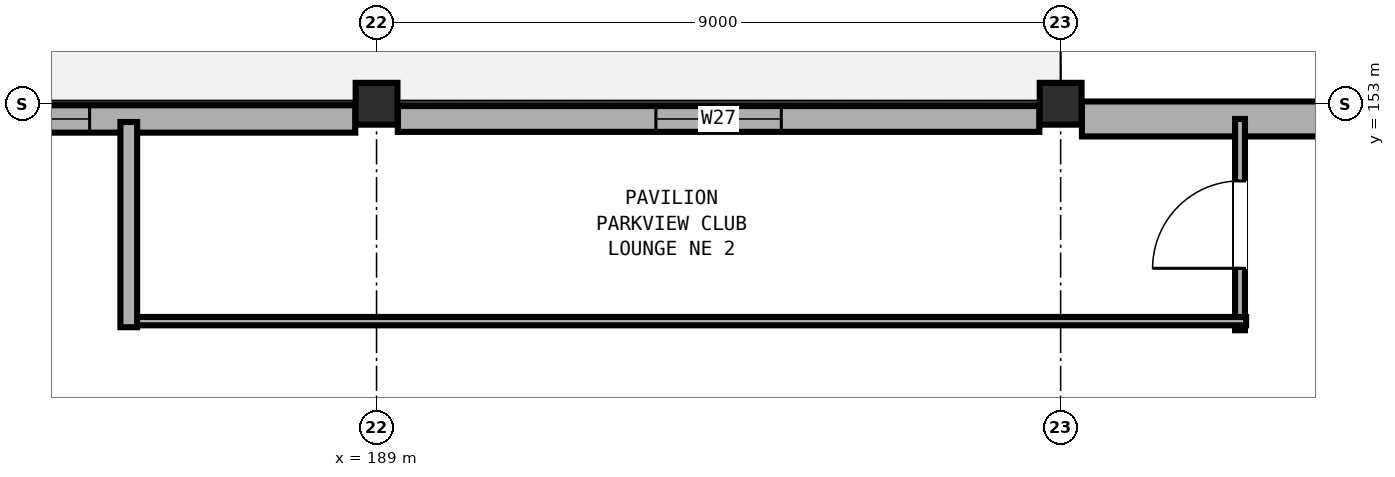
"""IFC4 building model, lengths in metres.
Left out: names, types, materials, properties, quantities, classifications, styles, units other than length and angle.
Written with IfcOpenShell. Run it as: python <this file> out.ifc"""

import sys

from ifc_helpers import new_model, si_unit, direction, frame, frame_2d, origin, origin_2d, place, context, subcontext, project, spatial, rectangle, extrude, element, fill, save


model = new_model("IFC4")
c1 = context("Model", 3, precision=1e-05, world=origin(), true_north=direction((0.0, 1.0)))
c2 = subcontext(c1, "Body", "Model", "MODEL_VIEW")
j1 = project(units=[si_unit("LENGTHUNIT", "METRE"), si_unit("PLANEANGLEUNIT", "RADIAN")], contexts=[c1])
p1 = place(None, origin())
s1 = spatial("IfcSite", under=j1, at=p1, CompositionType="ELEMENT")
p2 = place(p1, origin())
s2 = spatial("IfcBuilding", under=s1, at=p2, CompositionType="ELEMENT")
p3 = place(p2, frame((0.0, 0.0, 9.6)))
s3 = spatial("IfcBuildingStorey", under=s2, at=p3, CompositionType="ELEMENT", Elevation=9.6)
for number, where, z_axis, x_axis in (
    (1, (189.0, 153.0, 0.0), (0.0, 0.0, 1.0), (1.0, 0.0, 0.0)),
    (2, (198.0, 153.0, 0.0), (0.0, 0.0, 1.0), (1.0, 0.0, 0.0)),
):
    element("IfcColumn", number, at=place(p3, frame(where, z_axis=z_axis, x_axis=x_axis)), inside=s3, PredefinedType="COLUMN", context=c2, shape_type="SweptSolid", body=[
        extrude(rectangle(XDim=0.55, YDim=0.55, at=origin_2d()), origin(), (0.0, 0.0, 1.0), 4.8),
    ])
p4 = place(p3, frame((180.28, 152.8, 0.0), z_axis=(0.0, 0.0, 1.0), x_axis=(1.0, 0.0, 0.0)))
e3 = element("IfcWall", 3, at=p4, inside=s3, PredefinedType="SOLIDWALL", context=c2, shape_type="SweptSolid", body=[
    extrude(rectangle(XDim=8.44, YDim=0.36, at=frame_2d((4.22, 0.0))), origin(), (0.0, 0.0, 1.0), 3.58),
])
p5 = place(p4, frame((3.495, 0.0, 0.9)))
e4 = element("IfcOpeningElement", 4, at=p5, cuts=e3, PredefinedType="OPENING", context=c2, shape_type="SweptSolid", body=[
    extrude(rectangle(XDim=1.45, YDim=1.85, at=frame_2d((0.725, 0.925))), frame((0.0, 0.19, 0.0), z_axis=(0.0, -1.0, 0.0), x_axis=(1.0, 0.0, 0.0)), (0.0, 0.0, 1.0), 0.38),
])
p6 = place(p3, frame((189.28, 152.8, 0.0), z_axis=(0.0, 0.0, 1.0), x_axis=(1.0, 0.0, 0.0)))
e5 = element("IfcWall", 5, at=p6, inside=s3, PredefinedType="SOLIDWALL", context=c2, shape_type="SweptSolid", body=[
    extrude(rectangle(XDim=8.44, YDim=0.34, at=frame_2d((4.22, 0.0))), origin(), (0.0, 0.0, 1.0), 3.58),
])
p7 = place(p6, frame((3.395, 0.0, 0.9)))
e6 = element("IfcOpeningElement", 6, at=p7, cuts=e5, PredefinedType="OPENING", context=c2, shape_type="SweptSolid", body=[
    extrude(rectangle(XDim=1.65, YDim=1.9, at=frame_2d((0.825, 0.95))), frame((0.0, 0.18, 0.0), z_axis=(0.0, -1.0, 0.0), x_axis=(1.0, 0.0, 0.0)), (0.0, 0.0, 1.0), 0.36),
])
p8 = place(p3, frame((198.28, 152.8, 0.0), z_axis=(0.0, 0.0, 1.0), x_axis=(1.0, 0.0, 0.0)))
e7 = element("IfcWall", 7, at=p8, inside=s3, PredefinedType="SOLIDWALL", context=c2, shape_type="SweptSolid", body=[
    extrude(rectangle(XDim=8.44, YDim=0.46, at=frame_2d((4.22, 0.0))), origin(), (0.0, 0.0, 1.0), 3.58),
])
p9 = place(p8, frame((3.295, 0.0, 0.9)))
e8 = element("IfcOpeningElement", 8, at=p9, cuts=e7, PredefinedType="OPENING", context=c2, shape_type="SweptSolid", body=[
    extrude(rectangle(XDim=1.85, YDim=1.95, at=frame_2d((0.925, 0.975))), frame((0.0, 0.24, 0.0), z_axis=(0.0, -1.0, 0.0), x_axis=(1.0, 0.0, 0.0)), (0.0, 0.0, 1.0), 0.48),
])
p10 = place(p3, frame((200.36, 150.02, 0.0), z_axis=(0.0, 0.0, 1.0), x_axis=(0.0, 1.0, 0.0)))
e9 = element("IfcWall", 9, at=p10, inside=s3, PredefinedType="PARTITIONING", context=c2, shape_type="SweptSolid", body=[
    extrude(rectangle(XDim=2.78, YDim=0.13, at=frame_2d((1.39, 0.0))), origin(), (0.0, 0.0, 1.0), 3.56),
])
p11 = place(p10, frame((0.815, 0.0, 0.0)))
e10 = element("IfcOpeningElement", 10, at=p11, cuts=e9, PredefinedType="OPENING", context=c2, shape_type="SweptSolid", body=[
    extrude(rectangle(XDim=1.15, YDim=2.15, at=frame_2d((0.575, 1.075))), frame((0.0, 0.075, 0.0), z_axis=(0.0, -1.0, 0.0), x_axis=(1.0, 0.0, 0.0)), (0.0, 0.0, 1.0), 0.15),
])
p12 = place(p3, frame((200.44, 150.14, 0.0), z_axis=(0.0, 0.0, 1.0), x_axis=(-1.0, 0.0, 0.0)))
e11 = element("IfcWall", 11, at=p12, inside=s3, PredefinedType="PARTITIONING", context=c2, shape_type="SweptSolid", body=[
    extrude(rectangle(XDim=14.78, YDim=0.11, at=frame_2d((7.39, 0.0))), origin(), (0.0, 0.0, 1.0), 3.56),
])
p13 = place(p3, frame((185.74, 150.06, 0.0), z_axis=(0.0, 0.0, 1.0), x_axis=(0.0, 1.0, 0.0)))
e12 = element("IfcWall", 12, at=p13, inside=s3, PredefinedType="PARTITIONING", context=c2, shape_type="SweptSolid", body=[
    extrude(rectangle(XDim=2.7, YDim=0.22, at=frame_2d((1.35, 0.0))), origin(), (0.0, 0.0, 1.0), 3.56),
])
p14 = place(p5, origin())
e13 = element("IfcWindow", 13, at=p14, inside=s3, PartitioningType="SINGLE_PANEL", PredefinedType="WINDOW", context=c2, shape_type="SweptSolid", body=[
    extrude(rectangle(XDim=1.45, YDim=1.85, at=frame_2d((0.725, 0.925))), frame((0.0, 0.03, 0.0), z_axis=(0.0, -1.0, 0.0), x_axis=(1.0, 0.0, 0.0)), (0.0, 0.0, 1.0), 0.06),
])
fill(e4, e13)
p15 = place(p7, origin())
e14 = element("IfcWindow", 14, at=p15, inside=s3, PartitioningType="SINGLE_PANEL", PredefinedType="WINDOW", context=c2, shape_type="SweptSolid", body=[
    extrude(rectangle(XDim=1.65, YDim=1.9, at=frame_2d((0.825, 0.95))), frame((0.0, 0.03, 0.0), z_axis=(0.0, -1.0, 0.0), x_axis=(1.0, 0.0, 0.0)), (0.0, 0.0, 1.0), 0.06),
])
fill(e6, e14)
p16 = place(p11, origin())
e15 = element("IfcDoor", 15, at=p16, inside=s3, OperationType="SINGLE_SWING_LEFT", PredefinedType="DOOR", context=c2, shape_type="SweptSolid", body=[
    extrude(rectangle(XDim=1.15, YDim=2.15, at=frame_2d((0.575, 1.075))), frame((0.0, 0.025, 0.0), z_axis=(0.0, -1.0, 0.0), x_axis=(1.0, 0.0, 0.0)), (0.0, 0.0, 1.0), 0.05),
])
fill(e10, e15)
save(model, sys.argv[1])
